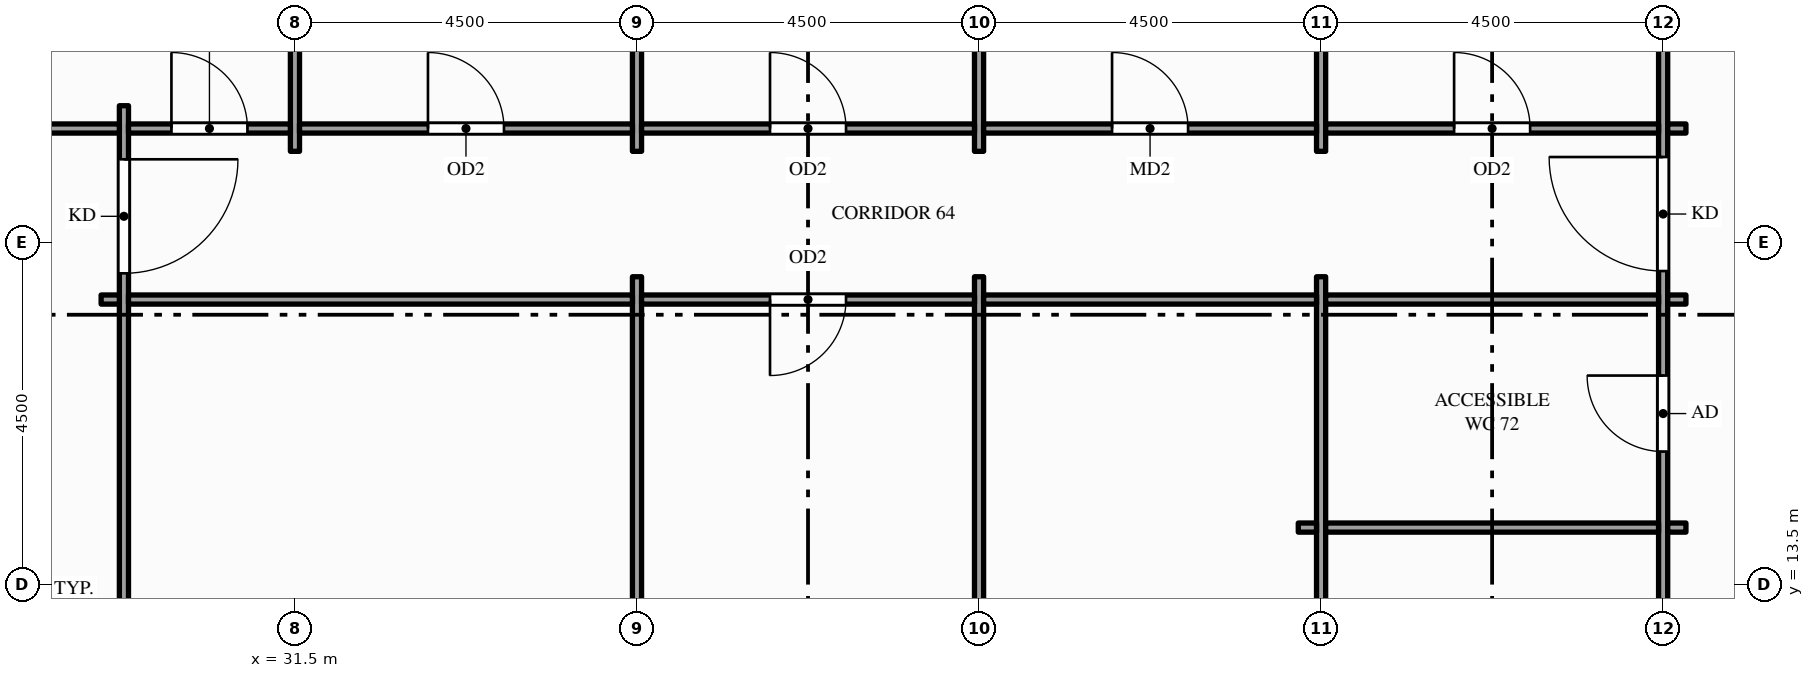
"""IFC4 building model, lengths in metres.
Left out: names, types, materials, properties, quantities, classifications, styles, units other than length and angle.
Written with IfcOpenShell. Run it as: python <this file> out.ifc"""

import sys

from ifc_helpers import new_model, si_unit, direction, frame, frame_2d, origin, place, context, subcontext, project, spatial, rectangle, extrude, element, fill, save


model = new_model("IFC4")
c1 = context("Model", 3, precision=1e-05, world=origin(), true_north=direction((0.0, 1.0)))
c2 = subcontext(c1, "Body", "Model", "MODEL_VIEW")
j1 = project(units=[si_unit("LENGTHUNIT", "METRE"), si_unit("PLANEANGLEUNIT", "RADIAN")], contexts=[c1])
p1 = place(None, origin())
s1 = spatial("IfcSite", under=j1, at=p1, CompositionType="ELEMENT")
p2 = place(p1, origin())
s2 = spatial("IfcBuilding", under=s1, at=p2, CompositionType="ELEMENT")
p3 = place(p2, frame((0.0, 0.0, 179.0)))
s3 = spatial("IfcBuildingStorey", under=s2, at=p3, CompositionType="ELEMENT", Elevation=179.0)
p4 = place(p3, frame((29.25, 5.7, 0.0), z_axis=(0.0, 0.0, 1.0), x_axis=(0.0, 1.0, 0.0)))
e1 = element("IfcWall", 1, at=p4, inside=s3, PredefinedType="PARTITIONING", context=c2, shape_type="SweptSolid", body=[
    extrude(rectangle(XDim=14.1, YDim=0.12, at=frame_2d((7.05, 0.0))), origin(), (0.0, 0.0, 1.0), 2.87),
])
p5 = place(p4, frame((0.705, 0.0, 0.0)))
e2 = element("IfcOpeningElement", 2, at=p5, cuts=e1, PredefinedType="OPENING", context=c2, shape_type="SweptSolid", body=[
    extrude(rectangle(XDim=1.5, YDim=2.1, at=frame_2d((0.75, 1.05))), frame((0.0, 0.07, 0.0), z_axis=(0.0, -1.0, 0.0), x_axis=(1.0, 0.0, 0.0)), (0.0, 0.0, 1.0), 0.14),
])
p6 = place(p4, frame((11.895, 0.0, 0.0)))
e3 = element("IfcOpeningElement", 3, at=p6, cuts=e1, PredefinedType="OPENING", context=c2, shape_type="SweptSolid", body=[
    extrude(rectangle(XDim=1.5, YDim=2.1, at=frame_2d((0.75, 1.05))), frame((0.0, 0.07, 0.0), z_axis=(0.0, -1.0, 0.0), x_axis=(1.0, 0.0, 0.0)), (0.0, 0.0, 1.0), 0.14),
])
p7 = place(p3, frame((31.5, 19.2, 0.0), z_axis=(0.0, 0.0, 1.0), x_axis=(0.0, 1.0, 0.0)))
e4 = element("IfcWall", 4, at=p7, inside=s3, PredefinedType="PARTITIONING", context=c2, shape_type="SweptSolid", body=[
    extrude(rectangle(XDim=4.65, YDim=0.12, at=frame_2d((2.325, 0.0))), origin(), (0.0, 0.0, 1.0), 2.87),
])
p8 = place(p3, frame((36.0, 7.95, 0.0), z_axis=(0.0, 0.0, 1.0), x_axis=(0.0, 1.0, 0.0)))
e5 = element("IfcWall", 5, at=p8, inside=s3, PredefinedType="PARTITIONING", context=c2, shape_type="SweptSolid", body=[
    extrude(rectangle(XDim=9.6, YDim=0.12, at=frame_2d((4.8, 0.0))), origin(), (0.0, 0.0, 1.0), 2.87),
])
p9 = place(p3, frame((36.0, 19.2, 0.0), z_axis=(0.0, 0.0, 1.0), x_axis=(0.0, 1.0, 0.0)))
e6 = element("IfcWall", 6, at=p9, inside=s3, PredefinedType="PARTITIONING", context=c2, shape_type="SweptSolid", body=[
    extrude(rectangle(XDim=4.65, YDim=0.12, at=frame_2d((2.325, 0.0))), origin(), (0.0, 0.0, 1.0), 2.87),
])
p10 = place(p3, frame((40.5, 7.95, 0.0), z_axis=(0.0, 0.0, 1.0), x_axis=(0.0, 1.0, 0.0)))
e7 = element("IfcWall", 7, at=p10, inside=s3, PredefinedType="PARTITIONING", context=c2, shape_type="SweptSolid", body=[
    extrude(rectangle(XDim=9.6, YDim=0.12, at=frame_2d((4.8, 0.0))), origin(), (0.0, 0.0, 1.0), 2.87),
])
p11 = place(p3, frame((40.5, 19.2, 0.0), z_axis=(0.0, 0.0, 1.0), x_axis=(0.0, 1.0, 0.0)))
e8 = element("IfcWall", 8, at=p11, inside=s3, PredefinedType="PARTITIONING", context=c2, shape_type="SweptSolid", body=[
    extrude(rectangle(XDim=4.65, YDim=0.12, at=frame_2d((2.325, 0.0))), origin(), (0.0, 0.0, 1.0), 2.87),
])
p12 = place(p3, frame((45.0, 7.95, 0.0), z_axis=(0.0, 0.0, 1.0), x_axis=(0.0, 1.0, 0.0)))
e9 = element("IfcWall", 9, at=p12, inside=s3, PredefinedType="PARTITIONING", context=c2, shape_type="SweptSolid", body=[
    extrude(rectangle(XDim=9.6, YDim=0.12, at=frame_2d((4.8, 0.0))), origin(), (0.0, 0.0, 1.0), 2.87),
])
p13 = place(p3, frame((45.0, 19.2, 0.0), z_axis=(0.0, 0.0, 1.0), x_axis=(0.0, 1.0, 0.0)))
e10 = element("IfcWall", 10, at=p13, inside=s3, PredefinedType="PARTITIONING", context=c2, shape_type="SweptSolid", body=[
    extrude(rectangle(XDim=4.65, YDim=0.12, at=frame_2d((2.325, 0.0))), origin(), (0.0, 0.0, 1.0), 2.87),
])
p14 = place(p3, frame((49.5, 1.65, 0.0), z_axis=(0.0, 0.0, 1.0), x_axis=(0.0, 1.0, 0.0)))
e11 = element("IfcWall", 11, at=p14, inside=s3, PredefinedType="PARTITIONING", context=c2, shape_type="SweptSolid", body=[
    extrude(rectangle(XDim=22.2, YDim=0.12, at=frame_2d((11.1, 0.0))), origin(), (0.0, 0.0, 1.0), 2.87),
])
p15 = place(p14, frame((4.725, 0.0, 0.0)))
e12 = element("IfcOpeningElement", 12, at=p15, cuts=e11, PredefinedType="OPENING", context=c2, shape_type="SweptSolid", body=[
    extrude(rectangle(XDim=1.5, YDim=2.1, at=frame_2d((0.75, 1.05))), frame((0.0, 0.07, 0.0), z_axis=(0.0, -1.0, 0.0), x_axis=(1.0, 0.0, 0.0)), (0.0, 0.0, 1.0), 0.14),
])
p16 = place(p14, frame((15.975, 0.0, 0.0)))
e13 = element("IfcOpeningElement", 13, at=p16, cuts=e11, PredefinedType="OPENING", context=c2, shape_type="SweptSolid", body=[
    extrude(rectangle(XDim=1.5, YDim=2.1, at=frame_2d((0.75, 1.05))), frame((0.0, 0.07, 0.0), z_axis=(0.0, -1.0, 0.0), x_axis=(1.0, 0.0, 0.0)), (0.0, 0.0, 1.0), 0.14),
])
p17 = place(p14, frame((7.6, 0.0, 0.0)))
e14 = element("IfcOpeningElement", 14, at=p17, cuts=e11, PredefinedType="OPENING", context=c2, shape_type="SweptSolid", body=[
    extrude(rectangle(XDim=0.9, YDim=2.1, at=frame_2d((0.45, 1.05))), frame((0.0, 0.07, 0.0), z_axis=(0.0, -1.0, 0.0), x_axis=(1.0, 0.0, 0.0)), (0.0, 0.0, 1.0), 0.14),
])
p18 = place(p14, frame((10.65, 0.0, 0.0)))
e15 = element("IfcOpeningElement", 15, at=p18, cuts=e11, PredefinedType="OPENING", context=c2, shape_type="SweptSolid", body=[
    extrude(rectangle(XDim=0.9, YDim=2.1, at=frame_2d((0.45, 1.05))), frame((0.0, 0.07, 0.0), z_axis=(0.0, -1.0, 0.0), x_axis=(1.0, 0.0, 0.0)), (0.0, 0.0, 1.0), 0.14),
])
p19 = place(p14, frame((13.6, 0.0, 0.0)))
e16 = element("IfcOpeningElement", 16, at=p19, cuts=e11, PredefinedType="OPENING", context=c2, shape_type="SweptSolid", body=[
    extrude(rectangle(XDim=1.0, YDim=2.1, at=frame_2d((0.5, 1.05))), frame((0.0, 0.07, 0.0), z_axis=(0.0, -1.0, 0.0), x_axis=(1.0, 0.0, 0.0)), (0.0, 0.0, 1.0), 0.14),
])
p20 = place(p3, frame((44.7, 14.25, 0.0), z_axis=(0.0, 0.0, 1.0), x_axis=(1.0, 0.0, 0.0)))
e17 = element("IfcWall", 17, at=p20, inside=s3, PredefinedType="PARTITIONING", context=c2, shape_type="SweptSolid", body=[
    extrude(rectangle(XDim=0.24, YDim=0.12, at=frame_2d((0.12, 0.0))), origin(), (0.0, 0.0, 1.0), 2.87),
])
p21 = place(p3, frame((45.06, 14.25, 0.0), z_axis=(0.0, 0.0, 1.0), x_axis=(1.0, 0.0, 0.0)))
e18 = element("IfcWall", 18, at=p21, inside=s3, PredefinedType="PARTITIONING", context=c2, shape_type="SweptSolid", body=[
    extrude(rectangle(XDim=4.38, YDim=0.12, at=frame_2d((2.19, 0.0))), origin(), (0.0, 0.0, 1.0), 2.87),
])
for number, where, z_axis, x_axis in (
    (19, (49.56, 14.25, 0.0), (0.0, 0.0, 1.0), (1.0, 0.0, 0.0)),
    (20, (28.95, 17.25, 0.0), (0.0, 0.0, 1.0), (1.0, 0.0, 0.0)),
):
    element("IfcWall", number, at=place(p3, frame(where, z_axis=z_axis, x_axis=x_axis)), inside=s3, PredefinedType="PARTITIONING", context=c2, shape_type="SweptSolid", body=[
        extrude(rectangle(XDim=0.24, YDim=0.12, at=frame_2d((0.12, 0.0))), origin(), (0.0, 0.0, 1.0), 2.87),
    ])
p22 = place(p3, frame((29.31, 17.25, 0.0), z_axis=(0.0, 0.0, 1.0), x_axis=(1.0, 0.0, 0.0)))
e21 = element("IfcWall", 21, at=p22, inside=s3, PredefinedType="PARTITIONING", context=c2, shape_type="SweptSolid", body=[
    extrude(rectangle(XDim=6.63, YDim=0.12, at=frame_2d((3.315, 0.0))), origin(), (0.0, 0.0, 1.0), 2.87),
])
p23 = place(p3, frame((36.06, 17.25, 0.0), z_axis=(0.0, 0.0, 1.0), x_axis=(1.0, 0.0, 0.0)))
e22 = element("IfcWall", 22, at=p23, inside=s3, PredefinedType="PARTITIONING", context=c2, shape_type="SweptSolid", body=[
    extrude(rectangle(XDim=4.38, YDim=0.12, at=frame_2d((2.19, 0.0))), origin(), (0.0, 0.0, 1.0), 2.87),
])
p24 = place(p23, frame((1.69, 0.0, 0.0)))
e23 = element("IfcOpeningElement", 23, at=p24, cuts=e22, PredefinedType="OPENING", context=c2, shape_type="SweptSolid", body=[
    extrude(rectangle(XDim=1.0, YDim=2.1, at=frame_2d((0.5, 1.05))), frame((0.0, 0.07, 0.0), z_axis=(0.0, -1.0, 0.0), x_axis=(1.0, 0.0, 0.0)), (0.0, 0.0, 1.0), 0.14),
])
for number, where, z_axis, x_axis in (
    (24, (40.56, 17.25, 0.0), (0.0, 0.0, 1.0), (1.0, 0.0, 0.0)),
    (25, (45.06, 17.25, 0.0), (0.0, 0.0, 1.0), (1.0, 0.0, 0.0)),
):
    element("IfcWall", number, at=place(p3, frame(where, z_axis=z_axis, x_axis=x_axis)), inside=s3, PredefinedType="PARTITIONING", context=c2, shape_type="SweptSolid", body=[
        extrude(rectangle(XDim=4.38, YDim=0.12, at=frame_2d((2.19, 0.0))), origin(), (0.0, 0.0, 1.0), 2.87),
    ])
p25 = place(p3, frame((49.56, 17.25, 0.0), z_axis=(0.0, 0.0, 1.0), x_axis=(1.0, 0.0, 0.0)))
e26 = element("IfcWall", 26, at=p25, inside=s3, PredefinedType="PARTITIONING", context=c2, shape_type="SweptSolid", body=[
    extrude(rectangle(XDim=0.24, YDim=0.12, at=frame_2d((0.12, 0.0))), origin(), (0.0, 0.0, 1.0), 2.87),
])
p26 = place(p3, frame((27.06, 19.5, 0.0), z_axis=(0.0, 0.0, 1.0), x_axis=(1.0, 0.0, 0.0)))
e27 = element("IfcWall", 27, at=p26, inside=s3, PredefinedType="PARTITIONING", context=c2, shape_type="SweptSolid", body=[
    extrude(rectangle(XDim=2.13, YDim=0.12, at=frame_2d((1.065, 0.0))), origin(), (0.0, 0.0, 1.0), 2.87),
])
p27 = place(p3, frame((29.31, 19.5, 0.0), z_axis=(0.0, 0.0, 1.0), x_axis=(1.0, 0.0, 0.0)))
e28 = element("IfcWall", 28, at=p27, inside=s3, PredefinedType="PARTITIONING", context=c2, shape_type="SweptSolid", body=[
    extrude(rectangle(XDim=2.13, YDim=0.12, at=frame_2d((1.065, 0.0))), origin(), (0.0, 0.0, 1.0), 2.87),
])
p28 = place(p27, frame((0.565, 0.0, 0.0)))
e29 = element("IfcOpeningElement", 29, at=p28, cuts=e28, PredefinedType="OPENING", context=c2, shape_type="SweptSolid", body=[
    extrude(rectangle(XDim=1.0, YDim=2.1, at=frame_2d((0.5, 1.05))), frame((0.0, 0.07, 0.0), z_axis=(0.0, -1.0, 0.0), x_axis=(1.0, 0.0, 0.0)), (0.0, 0.0, 1.0), 0.14),
])
p29 = place(p3, frame((31.56, 19.5, 0.0), z_axis=(0.0, 0.0, 1.0), x_axis=(1.0, 0.0, 0.0)))
e30 = element("IfcWall", 30, at=p29, inside=s3, PredefinedType="PARTITIONING", context=c2, shape_type="SweptSolid", body=[
    extrude(rectangle(XDim=4.38, YDim=0.12, at=frame_2d((2.19, 0.0))), origin(), (0.0, 0.0, 1.0), 2.87),
])
p30 = place(p29, frame((1.69, 0.0, 0.0)))
e31 = element("IfcOpeningElement", 31, at=p30, cuts=e30, PredefinedType="OPENING", context=c2, shape_type="SweptSolid", body=[
    extrude(rectangle(XDim=1.0, YDim=2.1, at=frame_2d((0.5, 1.05))), frame((0.0, 0.07, 0.0), z_axis=(0.0, -1.0, 0.0), x_axis=(1.0, 0.0, 0.0)), (0.0, 0.0, 1.0), 0.14),
])
p31 = place(p3, frame((36.06, 19.5, 0.0), z_axis=(0.0, 0.0, 1.0), x_axis=(1.0, 0.0, 0.0)))
e32 = element("IfcWall", 32, at=p31, inside=s3, PredefinedType="PARTITIONING", context=c2, shape_type="SweptSolid", body=[
    extrude(rectangle(XDim=4.38, YDim=0.12, at=frame_2d((2.19, 0.0))), origin(), (0.0, 0.0, 1.0), 2.87),
])
p32 = place(p31, frame((1.69, 0.0, 0.0)))
e33 = element("IfcOpeningElement", 33, at=p32, cuts=e32, PredefinedType="OPENING", context=c2, shape_type="SweptSolid", body=[
    extrude(rectangle(XDim=1.0, YDim=2.1, at=frame_2d((0.5, 1.05))), frame((0.0, 0.07, 0.0), z_axis=(0.0, -1.0, 0.0), x_axis=(1.0, 0.0, 0.0)), (0.0, 0.0, 1.0), 0.14),
])
p33 = place(p3, frame((40.56, 19.5, 0.0), z_axis=(0.0, 0.0, 1.0), x_axis=(1.0, 0.0, 0.0)))
e34 = element("IfcWall", 34, at=p33, inside=s3, PredefinedType="PARTITIONING", context=c2, shape_type="SweptSolid", body=[
    extrude(rectangle(XDim=4.38, YDim=0.12, at=frame_2d((2.19, 0.0))), origin(), (0.0, 0.0, 1.0), 2.87),
])
p34 = place(p33, frame((1.69, 0.0, 0.0)))
e35 = element("IfcOpeningElement", 35, at=p34, cuts=e34, PredefinedType="OPENING", context=c2, shape_type="SweptSolid", body=[
    extrude(rectangle(XDim=1.0, YDim=2.1, at=frame_2d((0.5, 1.05))), frame((0.0, 0.07, 0.0), z_axis=(0.0, -1.0, 0.0), x_axis=(1.0, 0.0, 0.0)), (0.0, 0.0, 1.0), 0.14),
])
p35 = place(p3, frame((45.06, 19.5, 0.0), z_axis=(0.0, 0.0, 1.0), x_axis=(1.0, 0.0, 0.0)))
e36 = element("IfcWall", 36, at=p35, inside=s3, PredefinedType="PARTITIONING", context=c2, shape_type="SweptSolid", body=[
    extrude(rectangle(XDim=4.38, YDim=0.12, at=frame_2d((2.19, 0.0))), origin(), (0.0, 0.0, 1.0), 2.87),
])
p36 = place(p35, frame((1.69, 0.0, 0.0)))
e37 = element("IfcOpeningElement", 37, at=p36, cuts=e36, PredefinedType="OPENING", context=c2, shape_type="SweptSolid", body=[
    extrude(rectangle(XDim=1.0, YDim=2.1, at=frame_2d((0.5, 1.05))), frame((0.0, 0.07, 0.0), z_axis=(0.0, -1.0, 0.0), x_axis=(1.0, 0.0, 0.0)), (0.0, 0.0, 1.0), 0.14),
])
p37 = place(p3, frame((49.56, 19.5, 0.0), z_axis=(0.0, 0.0, 1.0), x_axis=(1.0, 0.0, 0.0)))
e38 = element("IfcWall", 38, at=p37, inside=s3, PredefinedType="PARTITIONING", context=c2, shape_type="SweptSolid", body=[
    extrude(rectangle(XDim=0.24, YDim=0.12, at=frame_2d((0.12, 0.0))), origin(), (0.0, 0.0, 1.0), 2.87),
])
p38 = place(p6, origin())
e39 = element("IfcDoor", 39, at=p38, inside=s3, OperationType="SINGLE_SWING_RIGHT", PredefinedType="DOOR", context=c2, shape_type="SweptSolid", body=[
    extrude(rectangle(XDim=1.5, YDim=2.1, at=frame_2d((0.75, 1.05))), frame((0.0, 0.025, 0.0), z_axis=(0.0, -1.0, 0.0), x_axis=(1.0, 0.0, 0.0)), (0.0, 0.0, 1.0), 0.05),
])
fill(e3, e39)
p39 = place(p16, origin())
e40 = element("IfcDoor", 40, at=p39, inside=s3, OperationType="SINGLE_SWING_RIGHT", PredefinedType="DOOR", context=c2, shape_type="SweptSolid", body=[
    extrude(rectangle(XDim=1.5, YDim=2.1, at=frame_2d((0.75, 1.05))), frame((0.0, 0.025, 0.0), z_axis=(0.0, -1.0, 0.0), x_axis=(1.0, 0.0, 0.0)), (0.0, 0.0, 1.0), 0.05),
])
fill(e13, e40)
p40 = place(p24, origin())
e41 = element("IfcDoor", 41, at=p40, inside=s3, OperationType="SINGLE_SWING_LEFT", PredefinedType="DOOR", context=c2, shape_type="SweptSolid", body=[
    extrude(rectangle(XDim=1.0, YDim=2.1, at=frame_2d((0.5, 1.05))), frame((0.0, 0.025, 0.0), z_axis=(0.0, -1.0, 0.0), x_axis=(1.0, 0.0, 0.0)), (0.0, 0.0, 1.0), 0.05),
])
fill(e23, e41)
p41 = place(p19, origin())
e42 = element("IfcDoor", 42, at=p41, inside=s3, OperationType="SINGLE_SWING_RIGHT", PredefinedType="DOOR", context=c2, shape_type="SweptSolid", body=[
    extrude(rectangle(XDim=1.0, YDim=2.1, at=frame_2d((0.5, 1.05))), frame((0.0, 0.025, 0.0), z_axis=(0.0, -1.0, 0.0), x_axis=(1.0, 0.0, 0.0)), (0.0, 0.0, 1.0), 0.05),
])
fill(e16, e42)
p42 = place(p28, origin())
e43 = element("IfcDoor", 43, at=p42, inside=s3, OperationType="SINGLE_SWING_LEFT", PredefinedType="DOOR", context=c2, shape_type="SweptSolid", body=[
    extrude(rectangle(XDim=1.0, YDim=2.1, at=frame_2d((0.5, 1.05))), frame((0.0, 0.025, 0.0), z_axis=(0.0, -1.0, 0.0), x_axis=(1.0, 0.0, 0.0)), (0.0, 0.0, 1.0), 0.05),
])
fill(e29, e43)
p43 = place(p30, origin())
e44 = element("IfcDoor", 44, at=p43, inside=s3, OperationType="SINGLE_SWING_LEFT", PredefinedType="DOOR", context=c2, shape_type="SweptSolid", body=[
    extrude(rectangle(XDim=1.0, YDim=2.1, at=frame_2d((0.5, 1.05))), frame((0.0, 0.025, 0.0), z_axis=(0.0, -1.0, 0.0), x_axis=(1.0, 0.0, 0.0)), (0.0, 0.0, 1.0), 0.05),
])
fill(e31, e44)
p44 = place(p32, origin())
e45 = element("IfcDoor", 45, at=p44, inside=s3, OperationType="SINGLE_SWING_LEFT", PredefinedType="DOOR", context=c2, shape_type="SweptSolid", body=[
    extrude(rectangle(XDim=1.0, YDim=2.1, at=frame_2d((0.5, 1.05))), frame((0.0, 0.025, 0.0), z_axis=(0.0, -1.0, 0.0), x_axis=(1.0, 0.0, 0.0)), (0.0, 0.0, 1.0), 0.05),
])
fill(e33, e45)
p45 = place(p34, origin())
e46 = element("IfcDoor", 46, at=p45, inside=s3, OperationType="SINGLE_SWING_LEFT", PredefinedType="DOOR", context=c2, shape_type="SweptSolid", body=[
    extrude(rectangle(XDim=1.0, YDim=2.1, at=frame_2d((0.5, 1.05))), frame((0.0, 0.025, 0.0), z_axis=(0.0, -1.0, 0.0), x_axis=(1.0, 0.0, 0.0)), (0.0, 0.0, 1.0), 0.05),
])
fill(e35, e46)
p46 = place(p36, origin())
e47 = element("IfcDoor", 47, at=p46, inside=s3, OperationType="SINGLE_SWING_LEFT", PredefinedType="DOOR", context=c2, shape_type="SweptSolid", body=[
    extrude(rectangle(XDim=1.0, YDim=2.1, at=frame_2d((0.5, 1.05))), frame((0.0, 0.025, 0.0), z_axis=(0.0, -1.0, 0.0), x_axis=(1.0, 0.0, 0.0)), (0.0, 0.0, 1.0), 0.05),
])
fill(e37, e47)
save(model, sys.argv[1])
